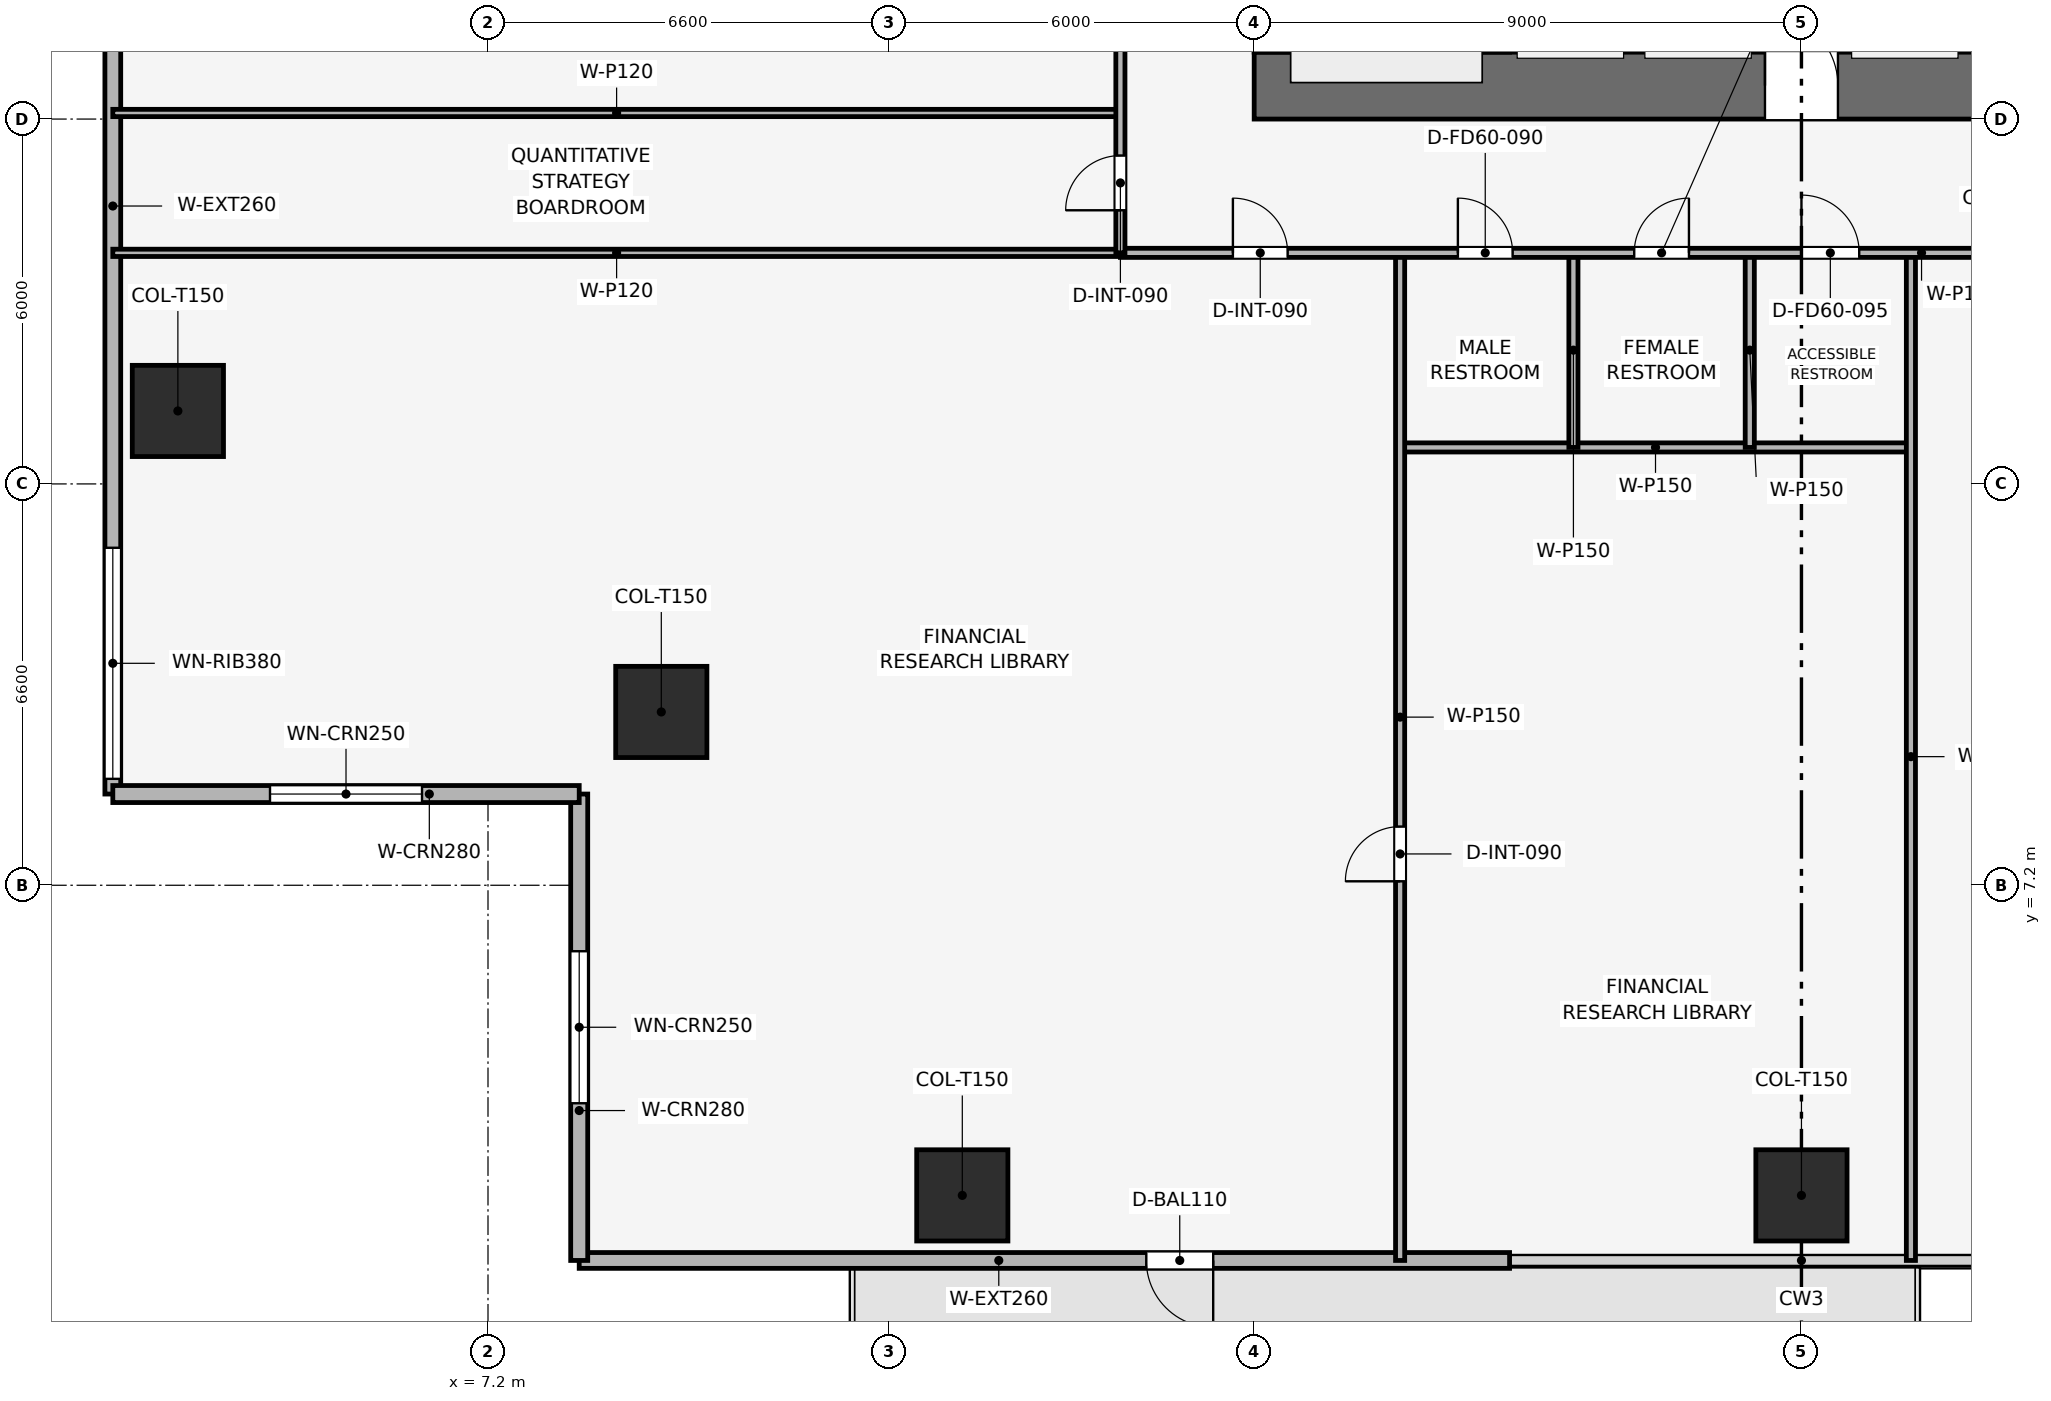
"""IFC4 building model, lengths in metres.
Left out: names, types, materials, properties, quantities, classifications, styles, units other than length and angle.
Written with IfcOpenShell. Run it as: python <this file> out.ifc"""

import sys

from ifc_helpers import new_model, si_unit, direction, frame, frame_2d, origin, origin_2d, place, context, subcontext, project, spatial, rectangle, extrude, element, fill, save


model = new_model("IFC4")
c1 = context("Model", 3, precision=1e-05, world=origin(), true_north=direction((0.0, 1.0)))
c2 = subcontext(c1, "Body", "Model", "MODEL_VIEW")
j1 = project(units=[si_unit("LENGTHUNIT", "METRE"), si_unit("PLANEANGLEUNIT", "RADIAN")], contexts=[c1])
p1 = place(None, origin())
s1 = spatial("IfcSite", under=j1, at=p1, CompositionType="ELEMENT")
p2 = place(p1, origin())
s2 = spatial("IfcBuilding", under=s1, at=p2, CompositionType="ELEMENT")
p3 = place(p2, frame((0.0, 0.0, 65.1)))
s3 = spatial("IfcBuildingStorey", under=s2, at=p3, CompositionType="ELEMENT", Elevation=65.1)
p4 = place(p3, frame((19.8, 20.35, 0.0), z_axis=(0.0, 0.0, 1.0), x_axis=(1.0, 0.0, 0.0)))
e1 = element("IfcWall", 1, at=p4, inside=s3, PredefinedType="SHEAR", context=c2, shape_type="SweptSolid", body=[
    extrude(rectangle(XDim=18.0, YDim=1.1, at=frame_2d((9.0, 0.0))), origin(), (0.0, 0.0, 1.0), 3.9),
])
p5 = place(p4, frame((8.4, 0.0, 0.0)))
e2 = element("IfcOpeningElement", 2, at=p5, cuts=e1, PredefinedType="OPENING", context=c2, shape_type="SweptSolid", body=[
    extrude(rectangle(XDim=1.2, YDim=2.2, at=frame_2d((0.6, 1.1))), frame((0.0, 0.56, 0.0), z_axis=(0.0, -1.0, 0.0), x_axis=(1.0, 0.0, 0.0)), (0.0, 0.0, 1.0), 1.12),
])
p6 = place(p3, frame((20.35, 20.9, 0.0), z_axis=(0.0, 0.0, 1.0), x_axis=(0.0, 1.0, 0.0)))
e3 = element("IfcWall", 3, at=p6, inside=s3, PredefinedType="SHEAR", context=c2, shape_type="SweptSolid", body=[
    extrude(rectangle(XDim=15.8, YDim=1.1, at=frame_2d((7.9, 0.0))), origin(), (0.0, 0.0, 1.0), 3.9),
])
p7 = place(p6, frame((9.9, 0.0, 0.0)))
e4 = element("IfcOpeningElement", 4, at=p7, cuts=e3, PredefinedType="OPENING", context=c2, shape_type="SweptSolid", body=[
    extrude(rectangle(XDim=1.1, YDim=2.15, at=frame_2d((0.55, 1.075))), frame((0.0, 0.56, 0.0), z_axis=(0.0, -1.0, 0.0), x_axis=(1.0, 0.0, 0.0)), (0.0, 0.0, 1.0), 1.12),
])
p8 = place(p3, frame((23.775, 20.9, 0.0), z_axis=(0.0, 0.0, 1.0), x_axis=(0.0, 1.0, 0.0)))
e5 = element("IfcWall", 5, at=p8, inside=s3, PredefinedType="SHEAR", context=c2, shape_type="SweptSolid", body=[
    extrude(rectangle(XDim=15.8, YDim=0.45, at=frame_2d((7.9, 0.0))), origin(), (0.0, 0.0, 1.0), 3.9),
])
for number, where, z_axis, x_axis in (
    (6, (15.0, 2.1, 0.003), (0.0, 0.0, 1.0), (1.0, 0.0, 0.0)),
    (7, (28.8, 2.1, 0.003), (0.0, 0.0, 1.0), (1.0, 0.0, 0.0)),
    (8, (2.1, 15.0, 0.003), (0.0, 0.0, 1.0), (1.0, 0.0, 0.0)),
    (9, (10.05, 10.05, 0.003), (0.0, 0.0, 1.0), (1.0, 0.0, 0.0)),
):
    element("IfcColumn", number, at=place(p3, frame(where, z_axis=z_axis, x_axis=x_axis)), inside=s3, PredefinedType="COLUMN", context=c2, shape_type="SweptSolid", body=[
        extrude(rectangle(XDim=1.5, YDim=1.5, at=origin_2d()), origin(), (0.0, 0.0, 1.0), 3.644),
    ])
p9 = place(p3, frame((24.0, 1.03, 0.0), z_axis=(0.0, 0.0, 1.0), x_axis=(-1.0, 0.0, 0.0)))
e10 = element("IfcWall", 10, at=p9, inside=s3, PredefinedType="SOLIDWALL", context=c2, shape_type="SweptSolid", body=[
    extrude(rectangle(XDim=15.3, YDim=0.26, at=frame_2d((7.65, 0.0))), origin(), (0.0, 0.0, 1.0), 3.65),
])
p10 = place(p9, frame((4.874, 0.0, 0.0)))
e11 = element("IfcOpeningElement", 11, at=p10, cuts=e10, PredefinedType="OPENING", context=c2, shape_type="SweptSolid", body=[
    extrude(rectangle(XDim=1.1, YDim=2.2, at=frame_2d((0.55, 1.1))), frame((0.0, 0.14, 0.0), z_axis=(0.0, -1.0, 0.0), x_axis=(1.0, 0.0, 0.0)), (0.0, 0.0, 1.0), 0.28),
])
p11 = place(p3, frame((1.03, 8.7, 0.0), z_axis=(0.0, 0.0, 1.0), x_axis=(0.0, 1.0, 0.0)))
e12 = element("IfcWall", 12, at=p11, inside=s3, PredefinedType="SOLIDWALL", context=c2, shape_type="SweptSolid", body=[
    extrude(rectangle(XDim=15.3, YDim=0.26, at=frame_2d((7.65, 0.0))), origin(), (0.0, 0.0, 1.0), 3.65),
])
p12 = place(p11, frame((0.25, 0.0, 0.9)))
e13 = element("IfcOpeningElement", 13, at=p12, cuts=e12, PredefinedType="OPENING", context=c2, shape_type="SweptSolid", body=[
    extrude(rectangle(XDim=3.8, YDim=1.9, at=frame_2d((1.9, 0.95))), frame((0.0, 0.14, 0.0), z_axis=(0.0, -1.0, 0.0), x_axis=(1.0, 0.0, 0.0)), (0.0, 0.0, 1.0), 0.28),
])
p13 = place(p3, frame((8.7, 1.03, 0.0), z_axis=(0.0, 0.0, 1.0), x_axis=(0.0, 1.0, 0.0)))
e14 = element("IfcWall", 14, at=p13, inside=s3, PredefinedType="SOLIDWALL", context=c2, shape_type="SweptSolid", body=[
    extrude(rectangle(XDim=7.67, YDim=0.28, at=frame_2d((3.835, 0.0))), origin(), (0.0, 0.0, 1.0), 3.65),
])
p14 = place(p13, frame((2.585, 0.0, 0.9)))
e15 = element("IfcOpeningElement", 15, at=p14, cuts=e14, PredefinedType="OPENING", context=c2, shape_type="SweptSolid", body=[
    extrude(rectangle(XDim=2.5, YDim=1.9, at=frame_2d((1.25, 0.95))), frame((0.0, 0.15, 0.0), z_axis=(0.0, -1.0, 0.0), x_axis=(1.0, 0.0, 0.0)), (0.0, 0.0, 1.0), 0.3),
])
p15 = place(p3, frame((8.7, 8.7, 0.0), z_axis=(0.0, 0.0, 1.0), x_axis=(-1.0, 0.0, 0.0)))
e16 = element("IfcWall", 16, at=p15, inside=s3, PredefinedType="SOLIDWALL", context=c2, shape_type="SweptSolid", body=[
    extrude(rectangle(XDim=7.67, YDim=0.28, at=frame_2d((3.835, 0.0))), origin(), (0.0, 0.0, 1.0), 3.65),
])
p16 = place(p15, frame((2.585, 0.0, 0.9)))
e17 = element("IfcOpeningElement", 17, at=p16, cuts=e16, PredefinedType="OPENING", context=c2, shape_type="SweptSolid", body=[
    extrude(rectangle(XDim=2.5, YDim=1.9, at=frame_2d((1.25, 0.95))), frame((0.0, 0.15, 0.0), z_axis=(0.0, -1.0, 0.0), x_axis=(1.0, 0.0, 0.0)), (0.0, 0.0, 1.0), 0.3),
])
p17 = place(p3, frame((22.2, 14.4, 0.0), z_axis=(0.0, 0.0, 1.0), x_axis=(1.0, 0.0, 0.0)))
e18 = element("IfcWall", 18, at=p17, inside=s3, PredefinedType="PARTITIONING", context=c2, shape_type="SweptSolid", body=[
    extrude(rectangle(XDim=8.4, YDim=0.15, at=frame_2d((4.2, 0.0))), origin(), (0.0, 0.0, 1.0), 3.085),
])
p18 = place(p3, frame((22.2, 1.03, 0.0), z_axis=(0.0, 0.0, 1.0), x_axis=(0.0, 1.0, 0.0)))
e19 = element("IfcWall", 19, at=p18, inside=s3, PredefinedType="PARTITIONING", context=c2, shape_type="SweptSolid", body=[
    extrude(rectangle(XDim=16.57, YDim=0.15, at=frame_2d((8.285, 0.0))), origin(), (0.0, 0.0, 1.0), 2.935),
])
p19 = place(p18, frame((6.235, 0.0, 0.0)))
e20 = element("IfcOpeningElement", 20, at=p19, cuts=e19, PredefinedType="OPENING", context=c2, shape_type="SweptSolid", body=[
    extrude(rectangle(XDim=0.9, YDim=2.1, at=frame_2d((0.45, 1.05))), frame((0.0, 0.085, 0.0), z_axis=(0.0, -1.0, 0.0), x_axis=(1.0, 0.0, 0.0)), (0.0, 0.0, 1.0), 0.17),
])
p20 = place(p3, frame((30.6, 1.03, 0.0), z_axis=(0.0, 0.0, 1.0), x_axis=(0.0, 1.0, 0.0)))
e21 = element("IfcWall", 21, at=p20, inside=s3, PredefinedType="PARTITIONING", context=c2, shape_type="SweptSolid", body=[
    extrude(rectangle(XDim=16.57, YDim=0.15, at=frame_2d((8.285, 0.0))), origin(), (0.0, 0.0, 1.0), 2.935),
])
for number, where, z_axis, x_axis in (
    (22, (25.05, 14.4, 0.0), (0.0, 0.0, 1.0), (0.0, 1.0, 0.0)),
    (23, (27.95, 14.4, 0.0), (0.0, 0.0, 1.0), (0.0, 1.0, 0.0)),
):
    element("IfcWall", number, at=place(p3, frame(where, z_axis=z_axis, x_axis=x_axis)), inside=s3, PredefinedType="PARTITIONING", context=c2, shape_type="SweptSolid", body=[
        extrude(rectangle(XDim=3.2, YDim=0.15, at=frame_2d((1.6, 0.0))), origin(), (0.0, 0.0, 1.0), 3.65),
    ])
for number, where, z_axis, x_axis in (
    (24, (1.03, 17.6, 0.0), (0.0, 0.0, 1.0), (1.0, 0.0, 0.0)),
    (25, (1.03, 19.9, 0.0), (0.0, 0.0, 1.0), (1.0, 0.0, 0.0)),
):
    element("IfcWall", number, at=place(p3, frame(where, z_axis=z_axis, x_axis=x_axis)), inside=s3, PredefinedType="PARTITIONING", context=c2, shape_type="SweptSolid", body=[
        extrude(rectangle(XDim=16.57, YDim=0.12, at=frame_2d((8.285, 0.0))), origin(), (0.0, 0.0, 1.0), 2.935),
    ])
p21 = place(p3, frame((17.6, 17.6, 0.0), z_axis=(0.0, 0.0, 1.0), x_axis=(1.0, 0.0, 0.0)))
e26 = element("IfcWall", 26, at=p21, inside=s3, PredefinedType="PARTITIONING", context=c2, shape_type="SweptSolid", body=[
    extrude(rectangle(XDim=22.4, YDim=0.15, at=frame_2d((11.2, 0.0))), origin(), (0.0, 0.0, 1.0), 3.085),
])
p22 = place(p21, frame((1.85, 0.0, 0.0)))
e27 = element("IfcOpeningElement", 27, at=p22, cuts=e26, PredefinedType="OPENING", context=c2, shape_type="SweptSolid", body=[
    extrude(rectangle(XDim=0.9, YDim=2.1, at=frame_2d((0.45, 1.05))), frame((0.0, 0.085, 0.0), z_axis=(0.0, -1.0, 0.0), x_axis=(1.0, 0.0, 0.0)), (0.0, 0.0, 1.0), 0.17),
])
p23 = place(p21, frame((5.55, 0.0, 0.0)))
e28 = element("IfcOpeningElement", 28, at=p23, cuts=e26, PredefinedType="OPENING", context=c2, shape_type="SweptSolid", body=[
    extrude(rectangle(XDim=0.9, YDim=2.1, at=frame_2d((0.45, 1.05))), frame((0.0, 0.085, 0.0), z_axis=(0.0, -1.0, 0.0), x_axis=(1.0, 0.0, 0.0)), (0.0, 0.0, 1.0), 0.17),
])
p24 = place(p21, frame((8.45, 0.0, 0.0)))
e29 = element("IfcOpeningElement", 29, at=p24, cuts=e26, PredefinedType="OPENING", context=c2, shape_type="SweptSolid", body=[
    extrude(rectangle(XDim=0.9, YDim=2.1, at=frame_2d((0.45, 1.05))), frame((0.0, 0.085, 0.0), z_axis=(0.0, -1.0, 0.0), x_axis=(1.0, 0.0, 0.0)), (0.0, 0.0, 1.0), 0.17),
])
p25 = place(p21, frame((11.2, 0.0, 0.0)))
e30 = element("IfcOpeningElement", 30, at=p25, cuts=e26, PredefinedType="OPENING", context=c2, shape_type="SweptSolid", body=[
    extrude(rectangle(XDim=0.95, YDim=2.1, at=frame_2d((0.475, 1.05))), frame((0.0, 0.085, 0.0), z_axis=(0.0, -1.0, 0.0), x_axis=(1.0, 0.0, 0.0)), (0.0, 0.0, 1.0), 0.17),
])
p26 = place(p21, frame((17.25, 0.0, 0.0)))
e31 = element("IfcOpeningElement", 31, at=p26, cuts=e26, PredefinedType="OPENING", context=c2, shape_type="SweptSolid", body=[
    extrude(rectangle(XDim=0.9, YDim=2.1, at=frame_2d((0.45, 1.05))), frame((0.0, 0.085, 0.0), z_axis=(0.0, -1.0, 0.0), x_axis=(1.0, 0.0, 0.0)), (0.0, 0.0, 1.0), 0.17),
])
p27 = place(p3, frame((17.6, 17.6, 0.0), z_axis=(0.0, 0.0, 1.0), x_axis=(0.0, 1.0, 0.0)))
e32 = element("IfcWall", 32, at=p27, inside=s3, PredefinedType="PARTITIONING", context=c2, shape_type="SweptSolid", body=[
    extrude(rectangle(XDim=22.4, YDim=0.15, at=frame_2d((11.2, 0.0))), origin(), (0.0, 0.0, 1.0), 3.085),
])
p28 = place(p27, frame((0.7, 0.0, 0.0)))
e33 = element("IfcOpeningElement", 33, at=p28, cuts=e32, PredefinedType="OPENING", context=c2, shape_type="SweptSolid", body=[
    extrude(rectangle(XDim=0.9, YDim=2.1, at=frame_2d((0.45, 1.05))), frame((0.0, 0.085, 0.0), z_axis=(0.0, -1.0, 0.0), x_axis=(1.0, 0.0, 0.0)), (0.0, 0.0, 1.0), 0.17),
])
p29 = place(p27, frame((6.365, 0.0, 0.0)))
e34 = element("IfcOpeningElement", 34, at=p29, cuts=e32, PredefinedType="OPENING", context=c2, shape_type="SweptSolid", body=[
    extrude(rectangle(XDim=0.9, YDim=2.1, at=frame_2d((0.45, 1.05))), frame((0.0, 0.085, 0.0), z_axis=(0.0, -1.0, 0.0), x_axis=(1.0, 0.0, 0.0)), (0.0, 0.0, 1.0), 0.17),
])
p30 = place(p27, frame((16.415, 0.0, 0.0)))
e35 = element("IfcOpeningElement", 35, at=p30, cuts=e32, PredefinedType="OPENING", context=c2, shape_type="SweptSolid", body=[
    extrude(rectangle(XDim=0.9, YDim=2.1, at=frame_2d((0.45, 1.05))), frame((0.0, 0.085, 0.0), z_axis=(0.0, -1.0, 0.0), x_axis=(1.0, 0.0, 0.0)), (0.0, 0.0, 1.0), 0.17),
])
p31 = place(p10, origin())
e36 = element("IfcDoor", 36, at=p31, inside=s3, OperationType="SINGLE_SWING_LEFT", PredefinedType="DOOR", context=c2, shape_type="SweptSolid", body=[
    extrude(rectangle(XDim=1.1, YDim=2.2, at=frame_2d((0.55, 1.1))), frame((0.0, 0.025, 0.0), z_axis=(0.0, -1.0, 0.0), x_axis=(1.0, 0.0, 0.0)), (0.0, 0.0, 1.0), 0.05),
])
fill(e11, e36)
p32 = place(p12, origin())
e37 = element("IfcWindow", 37, at=p32, inside=s3, PartitioningType="SINGLE_PANEL", PredefinedType="WINDOW", context=c2, shape_type="SweptSolid", body=[
    extrude(rectangle(XDim=3.8, YDim=1.9, at=frame_2d((1.9, 0.95))), frame((0.0, 0.03, 0.0), z_axis=(0.0, -1.0, 0.0), x_axis=(1.0, 0.0, 0.0)), (0.0, 0.0, 1.0), 0.06),
])
fill(e13, e37)
p33 = place(p14, origin())
e38 = element("IfcWindow", 38, at=p33, inside=s3, PartitioningType="SINGLE_PANEL", PredefinedType="WINDOW", context=c2, shape_type="SweptSolid", body=[
    extrude(rectangle(XDim=2.5, YDim=1.9, at=frame_2d((1.25, 0.95))), frame((0.0, 0.03, 0.0), z_axis=(0.0, -1.0, 0.0), x_axis=(1.0, 0.0, 0.0)), (0.0, 0.0, 1.0), 0.06),
])
fill(e15, e38)
p34 = place(p16, origin())
e39 = element("IfcWindow", 39, at=p34, inside=s3, PartitioningType="SINGLE_PANEL", PredefinedType="WINDOW", context=c2, shape_type="SweptSolid", body=[
    extrude(rectangle(XDim=2.5, YDim=1.9, at=frame_2d((1.25, 0.95))), frame((0.0, 0.03, 0.0), z_axis=(0.0, -1.0, 0.0), x_axis=(1.0, 0.0, 0.0)), (0.0, 0.0, 1.0), 0.06),
])
fill(e17, e39)
p35 = place(p19, origin())
e40 = element("IfcDoor", 40, at=p35, inside=s3, OperationType="SINGLE_SWING_LEFT", PredefinedType="DOOR", context=c2, shape_type="SweptSolid", body=[
    extrude(rectangle(XDim=0.9, YDim=2.1, at=frame_2d((0.45, 1.05))), frame((0.0, 0.025, 0.0), z_axis=(0.0, -1.0, 0.0), x_axis=(1.0, 0.0, 0.0)), (0.0, 0.0, 1.0), 0.05),
])
fill(e20, e40)
p36 = place(p22, origin())
e41 = element("IfcDoor", 41, at=p36, inside=s3, OperationType="SINGLE_SWING_LEFT", PredefinedType="DOOR", context=c2, shape_type="SweptSolid", body=[
    extrude(rectangle(XDim=0.9, YDim=2.1, at=frame_2d((0.45, 1.05))), frame((0.0, 0.025, 0.0), z_axis=(0.0, -1.0, 0.0), x_axis=(1.0, 0.0, 0.0)), (0.0, 0.0, 1.0), 0.05),
])
fill(e27, e41)
p37 = place(p23, origin())
e42 = element("IfcDoor", 42, at=p37, inside=s3, OperationType="SINGLE_SWING_LEFT", PredefinedType="DOOR", context=c2, shape_type="SweptSolid", body=[
    extrude(rectangle(XDim=0.9, YDim=2.1, at=frame_2d((0.45, 1.05))), frame((0.0, 0.025, 0.0), z_axis=(0.0, -1.0, 0.0), x_axis=(1.0, 0.0, 0.0)), (0.0, 0.0, 1.0), 0.05),
])
fill(e28, e42)
p38 = place(p24, origin())
e43 = element("IfcDoor", 43, at=p38, inside=s3, OperationType="SINGLE_SWING_RIGHT", PredefinedType="DOOR", context=c2, shape_type="SweptSolid", body=[
    extrude(rectangle(XDim=0.9, YDim=2.1, at=frame_2d((0.45, 1.05))), frame((0.0, 0.025, 0.0), z_axis=(0.0, -1.0, 0.0), x_axis=(1.0, 0.0, 0.0)), (0.0, 0.0, 1.0), 0.05),
])
fill(e29, e43)
p39 = place(p25, origin())
e44 = element("IfcDoor", 44, at=p39, inside=s3, OperationType="SINGLE_SWING_LEFT", PredefinedType="DOOR", context=c2, shape_type="SweptSolid", body=[
    extrude(rectangle(XDim=0.95, YDim=2.1, at=frame_2d((0.475, 1.05))), frame((0.0, 0.025, 0.0), z_axis=(0.0, -1.0, 0.0), x_axis=(1.0, 0.0, 0.0)), (0.0, 0.0, 1.0), 0.05),
])
fill(e30, e44)
p40 = place(p28, origin())
e45 = element("IfcDoor", 45, at=p40, inside=s3, OperationType="SINGLE_SWING_LEFT", PredefinedType="DOOR", context=c2, shape_type="SweptSolid", body=[
    extrude(rectangle(XDim=0.9, YDim=2.1, at=frame_2d((0.45, 1.05))), frame((0.0, 0.025, 0.0), z_axis=(0.0, -1.0, 0.0), x_axis=(1.0, 0.0, 0.0)), (0.0, 0.0, 1.0), 0.05),
])
fill(e33, e45)
p41 = place(p5, origin())
e46 = element("IfcDoor", 46, at=p41, inside=s3, OperationType="SINGLE_SWING_LEFT", PredefinedType="DOOR", context=c2, shape_type="SweptSolid", body=[
    extrude(rectangle(XDim=1.2, YDim=2.2, at=frame_2d((0.6, 1.1))), frame((0.0, 0.025, 0.0), z_axis=(0.0, -1.0, 0.0), x_axis=(1.0, 0.0, 0.0)), (0.0, 0.0, 1.0), 0.05),
])
fill(e2, e46)
save(model, sys.argv[1])
